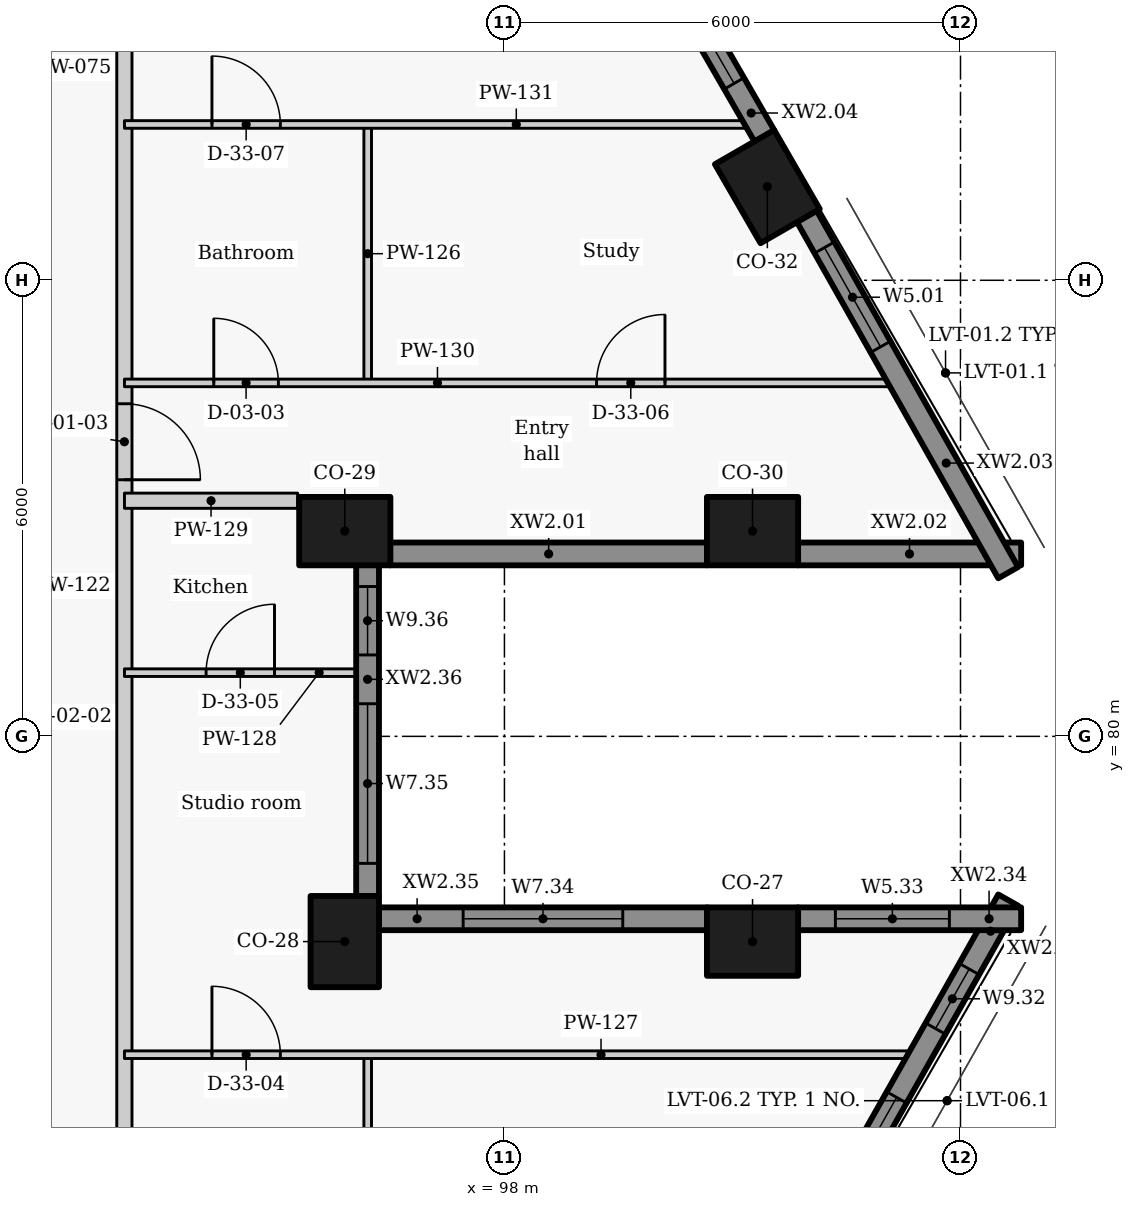
"""IFC4 building model, lengths in metres.
Left out: names, types, materials, properties, quantities, classifications, styles, units other than length and angle.
Written with IfcOpenShell. Run it as: python <this file> out.ifc"""

import sys

from ifc_helpers import new_model, si_unit, direction, frame, frame_2d, origin, origin_2d, place, context, subcontext, project, spatial, rectangle, extrude, element, fill, save


model = new_model("IFC4")
c1 = context("Model", 3, precision=1e-05, world=origin(), true_north=direction((0.0, 1.0)))
c2 = subcontext(c1, "Body", "Model", "MODEL_VIEW")
j1 = project(units=[si_unit("LENGTHUNIT", "METRE"), si_unit("PLANEANGLEUNIT", "RADIAN")], contexts=[c1])
p1 = place(None, origin())
s1 = spatial("IfcSite", under=j1, at=p1, CompositionType="ELEMENT")
p2 = place(p1, origin())
s2 = spatial("IfcBuilding", under=s1, at=p2, CompositionType="ELEMENT")
p3 = place(p2, frame((0.0, 0.0, 180.0)))
s3 = spatial("IfcBuildingStorey", under=s2, at=p3, CompositionType="ELEMENT", Elevation=180.0)
for number, where, z_axis, x_axis in (
    (1, (101.264, 77.3, 0.0), (0.0, 0.0, 1.0), (-1.0, 0.0, 0.0)),
    (2, (95.899, 77.3, 0.0), (0.0, 0.0, 1.0), (0.0, 1.0, 0.0)),
    (3, (95.899, 82.7, 0.0), (0.0, 0.0, 1.0), (1.0, 0.0, 0.0)),
    (4, (101.264, 82.7, 0.0), (0.0, 0.0, 1.0), (1.0, 0.0, 0.0)),
    (5, (101.459, 87.232, 0.0), (0.0, 0.0, 1.0), (-0.5, 0.866, 0.0)),
):
    element("IfcColumn", number, at=place(p3, frame(where, z_axis=z_axis, x_axis=x_axis)), inside=s3, PredefinedType="COLUMN", context=c2, shape_type="SweptSolid", body=[
        extrude(rectangle(XDim=1.2, YDim=0.9, at=origin_2d()), origin(), (0.0, 0.0, 1.0), 3.3),
    ])
p4 = place(p3, frame((96.496, 82.4, 0.0), z_axis=(0.0, 0.0, 1.0), x_axis=(1.0, 0.0, 0.0)))
e6 = element("IfcWall", 6, at=p4, inside=s3, PredefinedType="SOLIDWALL", context=c2, shape_type="SweptSolid", body=[
    extrude(rectangle(XDim=4.172, YDim=0.3, at=frame_2d((2.086, 0.0))), origin(), (0.0, 0.0, 1.0), 2.425),
])
p5 = place(p3, frame((101.86, 82.4, 0.0), z_axis=(0.0, 0.0, 1.0), x_axis=(1.0, 0.0, 0.0)))
e7 = element("IfcWall", 7, at=p5, inside=s3, PredefinedType="SOLIDWALL", context=c2, shape_type="SweptSolid", body=[
    extrude(rectangle(XDim=2.938, YDim=0.3, at=frame_2d((1.469, 0.0))), origin(), (0.0, 0.0, 1.0), 2.425),
])
p6 = place(p3, frame((104.627, 82.154, 0.0), z_axis=(0.0, 0.0, 1.0), x_axis=(-0.492033360928, 0.870576344575, 0.0)))
e8 = element("IfcWall", 8, at=p6, inside=s3, PredefinedType="SOLIDWALL", context=c2, shape_type="SweptSolid", body=[
    extrude(rectangle(XDim=5.387, YDim=0.3, at=frame_2d((2.693, 0.0))), origin(), (0.0, 0.0, 1.0), 2.425),
])
p7 = place(p6, frame((3.412, 0.0, 0.9)))
e9 = element("IfcOpeningElement", 9, at=p7, cuts=e8, PredefinedType="OPENING", context=c2, shape_type="SweptSolid", body=[
    extrude(rectangle(XDim=1.5, YDim=1.1, at=frame_2d((0.75, 0.55))), frame((0.0, 0.16, 0.0), z_axis=(0.0, -1.0, 0.0), x_axis=(1.0, 0.0, 0.0)), (0.0, 0.0, 1.0), 0.32),
])
p8 = place(p3, frame((101.421, 87.898, 0.0), z_axis=(0.0, 0.0, 1.0), x_axis=(-0.499955427682, 0.866051136095, 0.0)))
e10 = element("IfcWall", 10, at=p8, inside=s3, PredefinedType="SOLIDWALL", context=c2, shape_type="SweptSolid", body=[
    extrude(rectangle(XDim=3.447, YDim=0.3, at=frame_2d((1.724, 0.0))), origin(), (0.0, 0.0, 1.0), 2.425),
])
p9 = place(p8, frame((0.798, 0.0, 0.9)))
e11 = element("IfcOpeningElement", 11, at=p9, cuts=e10, PredefinedType="OPENING", context=c2, shape_type="SweptSolid", body=[
    extrude(rectangle(XDim=2.1, YDim=1.1, at=frame_2d((1.05, 0.55))), frame((0.0, 0.16, 0.0), z_axis=(0.0, -1.0, 0.0), x_axis=(1.0, 0.0, 0.0)), (0.0, 0.0, 1.0), 0.32),
])
p10 = place(p3, frame((101.977, 73.157, 0.0), z_axis=(0.0, 0.0, 1.0), x_axis=(0.492033360928, 0.870576344575, 0.0)))
e12 = element("IfcWall", 12, at=p10, inside=s3, PredefinedType="SOLIDWALL", context=c2, shape_type="SweptSolid", body=[
    extrude(rectangle(XDim=5.387, YDim=0.3, at=frame_2d((2.693, 0.0))), origin(), (0.0, 0.0, 1.0), 2.425),
])
p11 = place(p10, frame((0.905, 0.0, 0.9)))
e13 = element("IfcOpeningElement", 13, at=p11, cuts=e12, PredefinedType="OPENING", context=c2, shape_type="SweptSolid", body=[
    extrude(rectangle(XDim=1.5, YDim=1.1, at=frame_2d((0.75, 0.55))), frame((0.0, 0.16, 0.0), z_axis=(0.0, -1.0, 0.0), x_axis=(1.0, 0.0, 0.0)), (0.0, 0.0, 1.0), 0.32),
])
p12 = place(p10, frame((3.444, 0.0, 0.9)))
e14 = element("IfcOpeningElement", 14, at=p12, cuts=e12, PredefinedType="OPENING", context=c2, shape_type="SweptSolid", body=[
    extrude(rectangle(XDim=0.9, YDim=1.1, at=frame_2d((0.45, 0.55))), frame((0.0, 0.16, 0.0), z_axis=(0.0, -1.0, 0.0), x_axis=(1.0, 0.0, 0.0)), (0.0, 0.0, 1.0), 0.32),
])
p13 = place(p3, frame((104.798, 77.6, 0.0), z_axis=(0.0, 0.0, 1.0), x_axis=(-1.0, 0.0, 0.0)))
e15 = element("IfcWall", 15, at=p13, inside=s3, PredefinedType="SOLIDWALL", context=c2, shape_type="SweptSolid", body=[
    extrude(rectangle(XDim=2.938, YDim=0.3, at=frame_2d((1.469, 0.0))), origin(), (0.0, 0.0, 1.0), 2.425),
])
p14 = place(p13, frame((0.944, 0.0, 0.9)))
e16 = element("IfcOpeningElement", 16, at=p14, cuts=e15, PredefinedType="OPENING", context=c2, shape_type="SweptSolid", body=[
    extrude(rectangle(XDim=1.5, YDim=1.1, at=frame_2d((0.75, 0.55))), frame((0.0, 0.16, 0.0), z_axis=(0.0, -1.0, 0.0), x_axis=(1.0, 0.0, 0.0)), (0.0, 0.0, 1.0), 0.32),
])
p15 = place(p3, frame((100.668, 77.6, 0.0), z_axis=(0.0, 0.0, 1.0), x_axis=(-1.0, 0.0, 0.0)))
e17 = element("IfcWall", 17, at=p15, inside=s3, PredefinedType="SOLIDWALL", context=c2, shape_type="SweptSolid", body=[
    extrude(rectangle(XDim=4.323, YDim=0.3, at=frame_2d((2.161, 0.0))), origin(), (0.0, 0.0, 1.0), 2.425),
])
p16 = place(p15, frame((1.111, 0.0, 0.9)))
e18 = element("IfcOpeningElement", 18, at=p16, cuts=e17, PredefinedType="OPENING", context=c2, shape_type="SweptSolid", body=[
    extrude(rectangle(XDim=2.1, YDim=1.1, at=frame_2d((1.05, 0.55))), frame((0.0, 0.16, 0.0), z_axis=(0.0, -1.0, 0.0), x_axis=(1.0, 0.0, 0.0)), (0.0, 0.0, 1.0), 0.32),
])
p17 = place(p3, frame((96.199, 77.896, 0.0), z_axis=(0.0, 0.0, 1.0), x_axis=(0.0, 1.0, 0.0)))
e19 = element("IfcWall", 19, at=p17, inside=s3, PredefinedType="SOLIDWALL", context=c2, shape_type="SweptSolid", body=[
    extrude(rectangle(XDim=4.358, YDim=0.3, at=frame_2d((2.179, 0.0))), origin(), (0.0, 0.0, 1.0), 2.425),
])
p18 = place(p17, frame((0.433, 0.0, 0.9)))
e20 = element("IfcOpeningElement", 20, at=p18, cuts=e19, PredefinedType="OPENING", context=c2, shape_type="SweptSolid", body=[
    extrude(rectangle(XDim=2.1, YDim=1.1, at=frame_2d((1.05, 0.55))), frame((0.0, 0.16, 0.0), z_axis=(0.0, -1.0, 0.0), x_axis=(1.0, 0.0, 0.0)), (0.0, 0.0, 1.0), 0.32),
])
p19 = place(p17, frame((3.175, 0.0, 0.9)))
e21 = element("IfcOpeningElement", 21, at=p19, cuts=e19, PredefinedType="OPENING", context=c2, shape_type="SweptSolid", body=[
    extrude(rectangle(XDim=0.9, YDim=1.1, at=frame_2d((0.45, 0.55))), frame((0.0, 0.16, 0.0), z_axis=(0.0, -1.0, 0.0), x_axis=(1.0, 0.0, 0.0)), (0.0, 0.0, 1.0), 0.32),
])
p20 = place(p3, frame((93.0, 101.281, 0.0), z_axis=(0.0, 0.0, 1.0), x_axis=(0.0, -1.0, 0.0)))
e22 = element("IfcWall", 22, at=p20, inside=s3, PredefinedType="PARTITIONING", context=c2, shape_type="SweptSolid", body=[
    extrude(rectangle(XDim=42.606, YDim=0.2, at=frame_2d((21.303, 0.0))), origin(), (0.0, 0.0, 1.0), 2.405),
])
p21 = place(p20, frame((39.33, 0.0, 0.0)))
e23 = element("IfcOpeningElement", 23, at=p21, cuts=e22, PredefinedType="OPENING", context=c2, shape_type="SweptSolid", body=[
    extrude(rectangle(XDim=1.0, YDim=2.1, at=frame_2d((0.5, 1.05))), frame((0.0, 0.11, 0.0), z_axis=(0.0, -1.0, 0.0), x_axis=(1.0, 0.0, 0.0)), (0.0, 0.0, 1.0), 0.22),
])
p22 = place(p20, frame((28.005, 0.0, 0.0)))
e24 = element("IfcOpeningElement", 24, at=p22, cuts=e22, PredefinedType="OPENING", context=c2, shape_type="SweptSolid", body=[
    extrude(rectangle(XDim=1.0, YDim=2.1, at=frame_2d((0.5, 1.05))), frame((0.0, 0.11, 0.0), z_axis=(0.0, -1.0, 0.0), x_axis=(1.0, 0.0, 0.0)), (0.0, 0.0, 1.0), 0.22),
])
p23 = place(p20, frame((16.905, 0.0, 0.0)))
e25 = element("IfcOpeningElement", 25, at=p23, cuts=e22, PredefinedType="OPENING", context=c2, shape_type="SweptSolid", body=[
    extrude(rectangle(XDim=1.0, YDim=2.1, at=frame_2d((0.5, 1.05))), frame((0.0, 0.11, 0.0), z_axis=(0.0, -1.0, 0.0), x_axis=(1.0, 0.0, 0.0)), (0.0, 0.0, 1.0), 0.22),
])
p24 = place(p3, frame((96.201, 73.55, 0.0), z_axis=(0.0, 0.0, 1.0), x_axis=(0.0, 1.0, 0.0)))
e26 = element("IfcWall", 26, at=p24, inside=s3, PredefinedType="PARTITIONING", context=c2, shape_type="SweptSolid", body=[
    extrude(rectangle(XDim=2.262, YDim=0.1, at=frame_2d((1.131, 0.0))), origin(), (0.0, 0.0, 1.0), 3.025),
])
p25 = place(p3, frame((96.201, 84.65, 0.0), z_axis=(0.0, 0.0, 1.0), x_axis=(0.0, 1.0, 0.0)))
e27 = element("IfcWall", 27, at=p25, inside=s3, PredefinedType="PARTITIONING", context=c2, shape_type="SweptSolid", body=[
    extrude(rectangle(XDim=3.4, YDim=0.1, at=frame_2d((1.7, 0.0))), origin(), (0.0, 0.0, 1.0), 3.025),
])
p26 = place(p3, frame((93.001, 75.812, 0.0), z_axis=(0.0, 0.0, 1.0), x_axis=(1.0, 0.0, 0.0)))
e28 = element("IfcWall", 28, at=p26, inside=s3, PredefinedType="PARTITIONING", context=c2, shape_type="SweptSolid", body=[
    extrude(rectangle(XDim=10.389, YDim=0.1, at=frame_2d((5.194, 0.0))), origin(), (0.0, 0.0, 1.0), 2.405),
])
p27 = place(p26, frame((1.151, 0.0, 0.0)))
e29 = element("IfcOpeningElement", 29, at=p27, cuts=e28, PredefinedType="OPENING", context=c2, shape_type="SweptSolid", body=[
    extrude(rectangle(XDim=0.9, YDim=2.1, at=frame_2d((0.45, 1.05))), frame((0.0, 0.06, 0.0), z_axis=(0.0, -1.0, 0.0), x_axis=(1.0, 0.0, 0.0)), (0.0, 0.0, 1.0), 0.12),
])
p28 = place(p3, frame((93.001, 80.838, 0.0), z_axis=(0.0, 0.0, 1.0), x_axis=(1.0, 0.0, 0.0)))
e30 = element("IfcWall", 30, at=p28, inside=s3, PredefinedType="PARTITIONING", context=c2, shape_type="SweptSolid", body=[
    extrude(rectangle(XDim=3.049, YDim=0.1, at=frame_2d((1.524, 0.0))), origin(), (0.0, 0.0, 1.0), 2.405),
])
p29 = place(p28, frame((1.074, 0.0, 0.0)))
e31 = element("IfcOpeningElement", 31, at=p29, cuts=e30, PredefinedType="OPENING", context=c2, shape_type="SweptSolid", body=[
    extrude(rectangle(XDim=0.9, YDim=2.1, at=frame_2d((0.45, 1.05))), frame((0.0, 0.06, 0.0), z_axis=(0.0, -1.0, 0.0), x_axis=(1.0, 0.0, 0.0)), (0.0, 0.0, 1.0), 0.12),
])
p30 = place(p3, frame((93.001, 83.1, 0.0), z_axis=(0.0, 0.0, 1.0), x_axis=(1.0, 0.0, 0.0)))
e32 = element("IfcWall", 32, at=p30, inside=s3, PredefinedType="PARTITIONING", context=c2, shape_type="SweptSolid", body=[
    extrude(rectangle(XDim=2.279, YDim=0.2, at=frame_2d((1.139, 0.0))), origin(), (0.0, 0.0, 1.0), 3.025),
])
p31 = place(p3, frame((93.001, 84.65, 0.0), z_axis=(0.0, 0.0, 1.0), x_axis=(1.0, 0.0, 0.0)))
e33 = element("IfcWall", 33, at=p31, inside=s3, PredefinedType="PARTITIONING", context=c2, shape_type="SweptSolid", body=[
    extrude(rectangle(XDim=10.122, YDim=0.1, at=frame_2d((5.061, 0.0))), origin(), (0.0, 0.0, 1.0), 2.405),
])
p32 = place(p31, frame((1.175, 0.0, 0.0)))
e34 = element("IfcOpeningElement", 34, at=p32, cuts=e33, PredefinedType="OPENING", context=c2, shape_type="SweptSolid", body=[
    extrude(rectangle(XDim=0.85, YDim=2.1, at=frame_2d((0.425, 1.05))), frame((0.0, 0.06, 0.0), z_axis=(0.0, -1.0, 0.0), x_axis=(1.0, 0.0, 0.0)), (0.0, 0.0, 1.0), 0.12),
])
p33 = place(p31, frame((6.211, 0.0, 0.0)))
e35 = element("IfcOpeningElement", 35, at=p33, cuts=e33, PredefinedType="OPENING", context=c2, shape_type="SweptSolid", body=[
    extrude(rectangle(XDim=0.9, YDim=2.1, at=frame_2d((0.45, 1.05))), frame((0.0, 0.06, 0.0), z_axis=(0.0, -1.0, 0.0), x_axis=(1.0, 0.0, 0.0)), (0.0, 0.0, 1.0), 0.12),
])
p34 = place(p3, frame((93.001, 88.05, 0.0), z_axis=(0.0, 0.0, 1.0), x_axis=(1.0, 0.0, 0.0)))
e36 = element("IfcWall", 36, at=p34, inside=s3, PredefinedType="PARTITIONING", context=c2, shape_type="SweptSolid", body=[
    extrude(rectangle(XDim=8.159, YDim=0.1, at=frame_2d((4.08, 0.0))), origin(), (0.0, 0.0, 1.0), 2.405),
])
p35 = place(p34, frame((1.151, 0.0, 0.0)))
e37 = element("IfcOpeningElement", 37, at=p35, cuts=e36, PredefinedType="OPENING", context=c2, shape_type="SweptSolid", body=[
    extrude(rectangle(XDim=0.9, YDim=2.1, at=frame_2d((0.45, 1.05))), frame((0.0, 0.06, 0.0), z_axis=(0.0, -1.0, 0.0), x_axis=(1.0, 0.0, 0.0)), (0.0, 0.0, 1.0), 0.12),
])
p36 = place(p7, origin())
e38 = element("IfcWindow", 38, at=p36, inside=s3, PartitioningType="SINGLE_PANEL", PredefinedType="WINDOW", context=c2, shape_type="SweptSolid", body=[
    extrude(rectangle(XDim=1.5, YDim=1.1, at=frame_2d((0.75, 0.55))), frame((0.0, 0.03, 0.0), z_axis=(0.0, -1.0, 0.0), x_axis=(1.0, 0.0, 0.0)), (0.0, 0.0, 1.0), 0.06),
])
fill(e9, e38)
p37 = place(p9, origin())
e39 = element("IfcWindow", 39, at=p37, inside=s3, PartitioningType="SINGLE_PANEL", PredefinedType="WINDOW", context=c2, shape_type="SweptSolid", body=[
    extrude(rectangle(XDim=2.1, YDim=1.1, at=frame_2d((1.05, 0.55))), frame((0.0, 0.03, 0.0), z_axis=(0.0, -1.0, 0.0), x_axis=(1.0, 0.0, 0.0)), (0.0, 0.0, 1.0), 0.06),
])
fill(e11, e39)
p38 = place(p11, origin())
e40 = element("IfcWindow", 40, at=p38, inside=s3, PartitioningType="SINGLE_PANEL", PredefinedType="WINDOW", context=c2, shape_type="SweptSolid", body=[
    extrude(rectangle(XDim=1.5, YDim=1.1, at=frame_2d((0.75, 0.55))), frame((0.0, 0.03, 0.0), z_axis=(0.0, -1.0, 0.0), x_axis=(1.0, 0.0, 0.0)), (0.0, 0.0, 1.0), 0.06),
])
fill(e13, e40)
p39 = place(p12, origin())
e41 = element("IfcWindow", 41, at=p39, inside=s3, PartitioningType="SINGLE_PANEL", PredefinedType="WINDOW", context=c2, shape_type="SweptSolid", body=[
    extrude(rectangle(XDim=0.9, YDim=1.1, at=frame_2d((0.45, 0.55))), frame((0.0, 0.03, 0.0), z_axis=(0.0, -1.0, 0.0), x_axis=(1.0, 0.0, 0.0)), (0.0, 0.0, 1.0), 0.06),
])
fill(e14, e41)
p40 = place(p14, origin())
e42 = element("IfcWindow", 42, at=p40, inside=s3, PartitioningType="SINGLE_PANEL", PredefinedType="WINDOW", context=c2, shape_type="SweptSolid", body=[
    extrude(rectangle(XDim=1.5, YDim=1.1, at=frame_2d((0.75, 0.55))), frame((0.0, 0.03, 0.0), z_axis=(0.0, -1.0, 0.0), x_axis=(1.0, 0.0, 0.0)), (0.0, 0.0, 1.0), 0.06),
])
fill(e16, e42)
p41 = place(p16, origin())
e43 = element("IfcWindow", 43, at=p41, inside=s3, PartitioningType="SINGLE_PANEL", PredefinedType="WINDOW", context=c2, shape_type="SweptSolid", body=[
    extrude(rectangle(XDim=2.1, YDim=1.1, at=frame_2d((1.05, 0.55))), frame((0.0, 0.03, 0.0), z_axis=(0.0, -1.0, 0.0), x_axis=(1.0, 0.0, 0.0)), (0.0, 0.0, 1.0), 0.06),
])
fill(e18, e43)
p42 = place(p18, origin())
e44 = element("IfcWindow", 44, at=p42, inside=s3, PartitioningType="SINGLE_PANEL", PredefinedType="WINDOW", context=c2, shape_type="SweptSolid", body=[
    extrude(rectangle(XDim=2.1, YDim=1.1, at=frame_2d((1.05, 0.55))), frame((0.0, 0.03, 0.0), z_axis=(0.0, -1.0, 0.0), x_axis=(1.0, 0.0, 0.0)), (0.0, 0.0, 1.0), 0.06),
])
fill(e20, e44)
p43 = place(p19, origin())
e45 = element("IfcWindow", 45, at=p43, inside=s3, PartitioningType="SINGLE_PANEL", PredefinedType="WINDOW", context=c2, shape_type="SweptSolid", body=[
    extrude(rectangle(XDim=0.9, YDim=1.1, at=frame_2d((0.45, 0.55))), frame((0.0, 0.03, 0.0), z_axis=(0.0, -1.0, 0.0), x_axis=(1.0, 0.0, 0.0)), (0.0, 0.0, 1.0), 0.06),
])
fill(e21, e45)
p44 = place(p27, origin())
e46 = element("IfcDoor", 46, at=p44, inside=s3, OperationType="SINGLE_SWING_LEFT", PredefinedType="DOOR", context=c2, shape_type="SweptSolid", body=[
    extrude(rectangle(XDim=0.9, YDim=2.1, at=frame_2d((0.45, 1.05))), frame((0.0, 0.025, 0.0), z_axis=(0.0, -1.0, 0.0), x_axis=(1.0, 0.0, 0.0)), (0.0, 0.0, 1.0), 0.05),
])
fill(e29, e46)
p45 = place(p29, origin())
e47 = element("IfcDoor", 47, at=p45, inside=s3, OperationType="SINGLE_SWING_RIGHT", PredefinedType="DOOR", context=c2, shape_type="SweptSolid", body=[
    extrude(rectangle(XDim=0.9, YDim=2.1, at=frame_2d((0.45, 1.05))), frame((0.0, 0.025, 0.0), z_axis=(0.0, -1.0, 0.0), x_axis=(1.0, 0.0, 0.0)), (0.0, 0.0, 1.0), 0.05),
])
fill(e31, e47)
p46 = place(p23, origin())
e48 = element("IfcDoor", 48, at=p46, inside=s3, OperationType="SINGLE_SWING_RIGHT", PredefinedType="DOOR", context=c2, shape_type="SweptSolid", body=[
    extrude(rectangle(XDim=1.0, YDim=2.1, at=frame_2d((0.5, 1.05))), frame((0.0, 0.025, 0.0), z_axis=(0.0, -1.0, 0.0), x_axis=(1.0, 0.0, 0.0)), (0.0, 0.0, 1.0), 0.05),
])
fill(e25, e48)
p47 = place(p32, origin())
e49 = element("IfcDoor", 49, at=p47, inside=s3, OperationType="SINGLE_SWING_LEFT", PredefinedType="DOOR", context=c2, shape_type="SweptSolid", body=[
    extrude(rectangle(XDim=0.85, YDim=2.1, at=frame_2d((0.425, 1.05))), frame((0.0, 0.025, 0.0), z_axis=(0.0, -1.0, 0.0), x_axis=(1.0, 0.0, 0.0)), (0.0, 0.0, 1.0), 0.05),
])
fill(e34, e49)
p48 = place(p33, origin())
e50 = element("IfcDoor", 50, at=p48, inside=s3, OperationType="SINGLE_SWING_RIGHT", PredefinedType="DOOR", context=c2, shape_type="SweptSolid", body=[
    extrude(rectangle(XDim=0.9, YDim=2.1, at=frame_2d((0.45, 1.05))), frame((0.0, 0.025, 0.0), z_axis=(0.0, -1.0, 0.0), x_axis=(1.0, 0.0, 0.0)), (0.0, 0.0, 1.0), 0.05),
])
fill(e35, e50)
p49 = place(p35, origin())
e51 = element("IfcDoor", 51, at=p49, inside=s3, OperationType="SINGLE_SWING_LEFT", PredefinedType="DOOR", context=c2, shape_type="SweptSolid", body=[
    extrude(rectangle(XDim=0.9, YDim=2.1, at=frame_2d((0.45, 1.05))), frame((0.0, 0.025, 0.0), z_axis=(0.0, -1.0, 0.0), x_axis=(1.0, 0.0, 0.0)), (0.0, 0.0, 1.0), 0.05),
])
fill(e37, e51)
save(model, sys.argv[1])
